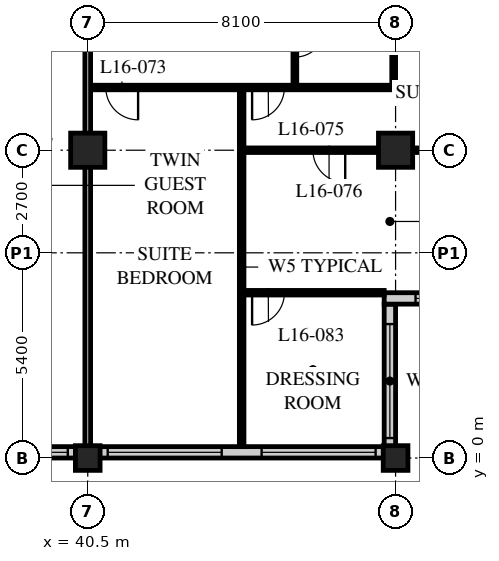
"""IFC4 building model, lengths in metres.
Left out: names, types, materials, properties, quantities, classifications, styles, units other than length and angle.
Written with IfcOpenShell. Run it as: python <this file> out.ifc"""

import sys

from ifc_helpers import new_model, si_unit, direction, frame, frame_2d, origin, origin_2d, place, context, subcontext, project, spatial, rectangle, hollow_rectangle, extrude, element, fill, save


model = new_model("IFC4")
c1 = context("Model", 3, precision=1e-05, world=origin(), true_north=direction((0.0, 1.0)))
c2 = subcontext(c1, "Body", "Model", "MODEL_VIEW")
j1 = project(units=[si_unit("LENGTHUNIT", "METRE"), si_unit("PLANEANGLEUNIT", "RADIAN")], contexts=[c1])
p1 = place(None, origin())
s1 = spatial("IfcSite", under=j1, at=p1, CompositionType="ELEMENT")
p2 = place(p1, origin())
s2 = spatial("IfcBuilding", under=s1, at=p2, CompositionType="ELEMENT")
p3 = place(p2, frame((0.0, 0.0, 67.0)))
s3 = spatial("IfcBuildingStorey", under=s2, at=p3, CompositionType="ELEMENT", Elevation=67.0)
p4 = place(p3, frame((40.5, 0.0, 0.0), z_axis=(0.0, 0.0, 1.0), x_axis=(1.0, 0.0, 0.0)))
e1 = element("IfcColumn", 1, at=p4, inside=s3, PredefinedType="COLUMN", context=c2, shape_type="SweptSolid", body=[
    extrude(hollow_rectangle(XDim=0.65, YDim=0.65, WallThickness=0.05, at=origin_2d()), origin(), (0.0, 0.0, 1.0), 3.4),
])
p5 = place(p3, frame((40.5, 8.1, 0.0), z_axis=(0.0, 0.0, 1.0), x_axis=(1.0, 0.0, 0.0)))
e2 = element("IfcColumn", 2, at=p5, inside=s3, PredefinedType="COLUMN", context=c2, shape_type="SweptSolid", body=[
    extrude(hollow_rectangle(XDim=0.9, YDim=0.9, WallThickness=0.09, at=origin_2d()), origin(), (0.0, 0.0, 1.0), 3.4),
])
p6 = place(p3, frame((48.6, 0.0, 0.0), z_axis=(0.0, 0.0, 1.0), x_axis=(1.0, 0.0, 0.0)))
e3 = element("IfcColumn", 3, at=p6, inside=s3, PredefinedType="COLUMN", context=c2, shape_type="SweptSolid", body=[
    extrude(hollow_rectangle(XDim=0.65, YDim=0.65, WallThickness=0.05, at=origin_2d()), origin(), (0.0, 0.0, 1.0), 3.4),
])
p7 = place(p3, frame((48.6, 8.1, 0.0), z_axis=(0.0, 0.0, 1.0), x_axis=(1.0, 0.0, 0.0)))
e4 = element("IfcColumn", 4, at=p7, inside=s3, PredefinedType="COLUMN", context=c2, shape_type="SweptSolid", body=[
    extrude(hollow_rectangle(XDim=0.9, YDim=0.9, WallThickness=0.09, at=origin_2d()), origin(), (0.0, 0.0, 1.0), 3.4),
])
p8 = place(p3, frame((8.4, 0.15, 0.0), z_axis=(0.0, 0.0, 1.0), x_axis=(1.0, 0.0, 0.0)))
e5 = element("IfcWall", 5, at=p8, inside=s3, PredefinedType="SOLIDWALL", context=c2, shape_type="SweptSolid", body=[
    extrude(rectangle(XDim=40.2, YDim=0.3, at=frame_2d((20.1, 0.0))), origin(), (0.0, 0.0, 1.0), 3.19),
])
p9 = place(p8, frame((0.225, 0.0, 0.9)))
e6 = element("IfcOpeningElement", 6, at=p9, cuts=e5, PredefinedType="OPENING", context=c2, shape_type="SweptSolid", body=[
    extrude(rectangle(XDim=3.0, YDim=2.0, at=frame_2d((1.5, 1.0))), frame((0.0, 0.16, 0.0), z_axis=(0.0, -1.0, 0.0), x_axis=(1.0, 0.0, 0.0)), (0.0, 0.0, 1.0), 0.32),
])
p10 = place(p8, frame((4.275, 0.0, 0.9)))
e7 = element("IfcOpeningElement", 7, at=p10, cuts=e5, PredefinedType="OPENING", context=c2, shape_type="SweptSolid", body=[
    extrude(rectangle(XDim=3.0, YDim=2.0, at=frame_2d((1.5, 1.0))), frame((0.0, 0.16, 0.0), z_axis=(0.0, -1.0, 0.0), x_axis=(1.0, 0.0, 0.0)), (0.0, 0.0, 1.0), 0.32),
])
p11 = place(p8, frame((8.325, 0.0, 0.9)))
e8 = element("IfcOpeningElement", 8, at=p11, cuts=e5, PredefinedType="OPENING", context=c2, shape_type="SweptSolid", body=[
    extrude(rectangle(XDim=3.0, YDim=2.0, at=frame_2d((1.5, 1.0))), frame((0.0, 0.16, 0.0), z_axis=(0.0, -1.0, 0.0), x_axis=(1.0, 0.0, 0.0)), (0.0, 0.0, 1.0), 0.32),
])
p12 = place(p8, frame((12.375, 0.0, 0.9)))
e9 = element("IfcOpeningElement", 9, at=p12, cuts=e5, PredefinedType="OPENING", context=c2, shape_type="SweptSolid", body=[
    extrude(rectangle(XDim=3.0, YDim=2.0, at=frame_2d((1.5, 1.0))), frame((0.0, 0.16, 0.0), z_axis=(0.0, -1.0, 0.0), x_axis=(1.0, 0.0, 0.0)), (0.0, 0.0, 1.0), 0.32),
])
p13 = place(p8, frame((16.425, 0.0, 0.9)))
e10 = element("IfcOpeningElement", 10, at=p13, cuts=e5, PredefinedType="OPENING", context=c2, shape_type="SweptSolid", body=[
    extrude(rectangle(XDim=3.0, YDim=2.0, at=frame_2d((1.5, 1.0))), frame((0.0, 0.16, 0.0), z_axis=(0.0, -1.0, 0.0), x_axis=(1.0, 0.0, 0.0)), (0.0, 0.0, 1.0), 0.32),
])
p14 = place(p8, frame((20.475, 0.0, 0.9)))
e11 = element("IfcOpeningElement", 11, at=p14, cuts=e5, PredefinedType="OPENING", context=c2, shape_type="SweptSolid", body=[
    extrude(rectangle(XDim=3.0, YDim=2.0, at=frame_2d((1.5, 1.0))), frame((0.0, 0.16, 0.0), z_axis=(0.0, -1.0, 0.0), x_axis=(1.0, 0.0, 0.0)), (0.0, 0.0, 1.0), 0.32),
])
p15 = place(p8, frame((24.525, 0.0, 0.9)))
e12 = element("IfcOpeningElement", 12, at=p15, cuts=e5, PredefinedType="OPENING", context=c2, shape_type="SweptSolid", body=[
    extrude(rectangle(XDim=3.0, YDim=2.0, at=frame_2d((1.5, 1.0))), frame((0.0, 0.16, 0.0), z_axis=(0.0, -1.0, 0.0), x_axis=(1.0, 0.0, 0.0)), (0.0, 0.0, 1.0), 0.32),
])
p16 = place(p8, frame((28.575, 0.0, 0.9)))
e13 = element("IfcOpeningElement", 13, at=p16, cuts=e5, PredefinedType="OPENING", context=c2, shape_type="SweptSolid", body=[
    extrude(rectangle(XDim=3.0, YDim=2.0, at=frame_2d((1.5, 1.0))), frame((0.0, 0.16, 0.0), z_axis=(0.0, -1.0, 0.0), x_axis=(1.0, 0.0, 0.0)), (0.0, 0.0, 1.0), 0.32),
])
p17 = place(p8, frame((32.625, 0.0, 0.9)))
e14 = element("IfcOpeningElement", 14, at=p17, cuts=e5, PredefinedType="OPENING", context=c2, shape_type="SweptSolid", body=[
    extrude(rectangle(XDim=3.0, YDim=2.0, at=frame_2d((1.5, 1.0))), frame((0.0, 0.16, 0.0), z_axis=(0.0, -1.0, 0.0), x_axis=(1.0, 0.0, 0.0)), (0.0, 0.0, 1.0), 0.32),
])
p18 = place(p8, frame((36.675, 0.0, 0.9)))
e15 = element("IfcOpeningElement", 15, at=p18, cuts=e5, PredefinedType="OPENING", context=c2, shape_type="SweptSolid", body=[
    extrude(rectangle(XDim=3.0, YDim=2.0, at=frame_2d((1.5, 1.0))), frame((0.0, 0.16, 0.0), z_axis=(0.0, -1.0, 0.0), x_axis=(1.0, 0.0, 0.0)), (0.0, 0.0, 1.0), 0.32),
])
p19 = place(p3, frame((48.45, 0.3, 0.0), z_axis=(0.0, 0.0, 1.0), x_axis=(0.0, 1.0, 0.0)))
e16 = element("IfcWall", 16, at=p19, inside=s3, PredefinedType="SOLIDWALL", context=c2, shape_type="SweptSolid", body=[
    extrude(rectangle(XDim=3.75, YDim=0.3, at=frame_2d((1.875, 0.0))), origin(), (0.0, 0.0, 1.0), 3.19),
])
p20 = place(p19, frame((0.225, 0.0, 0.9)))
e17 = element("IfcOpeningElement", 17, at=p20, cuts=e16, PredefinedType="OPENING", context=c2, shape_type="SweptSolid", body=[
    extrude(rectangle(XDim=3.0, YDim=1.5, at=frame_2d((1.5, 0.75))), frame((0.0, 0.16, 0.0), z_axis=(0.0, -1.0, 0.0), x_axis=(1.0, 0.0, 0.0)), (0.0, 0.0, 1.0), 0.32),
])
p21 = place(p3, frame((48.3, 4.2, 0.0), z_axis=(0.0, 0.0, 1.0), x_axis=(1.0, 0.0, 0.0)))
e18 = element("IfcWall", 18, at=p21, inside=s3, PredefinedType="SOLIDWALL", context=c2, shape_type="SweptSolid", body=[
    extrude(rectangle(XDim=4.35, YDim=0.3, at=frame_2d((2.175, 0.0))), origin(), (0.0, 0.0, 1.0), 3.19),
])
p22 = place(p21, frame((0.825, 0.0, 0.9)))
e19 = element("IfcOpeningElement", 19, at=p22, cuts=e18, PredefinedType="OPENING", context=c2, shape_type="SweptSolid", body=[
    extrude(rectangle(XDim=3.0, YDim=1.5, at=frame_2d((1.5, 0.75))), frame((0.0, 0.16, 0.0), z_axis=(0.0, -1.0, 0.0), x_axis=(1.0, 0.0, 0.0)), (0.0, 0.0, 1.0), 0.32),
])
p23 = place(p3, frame((40.5, 9.75, 0.0), z_axis=(0.0, 0.0, 1.0), x_axis=(1.0, 0.0, 0.0)))
e20 = element("IfcWall", 20, at=p23, inside=s3, PredefinedType="PARTITIONING", context=c2, shape_type="SweptSolid", body=[
    extrude(rectangle(XDim=8.05, YDim=0.12, at=frame_2d((4.025, 0.0))), origin(), (0.0, 0.0, 1.0), 3.19),
])
p24 = place(p23, frame((0.475, 0.0, 0.0)))
e21 = element("IfcOpeningElement", 21, at=p24, cuts=e20, PredefinedType="OPENING", context=c2, shape_type="SweptSolid", body=[
    extrude(rectangle(XDim=0.85, YDim=2.1, at=frame_2d((0.425, 1.05))), frame((0.0, 0.07, 0.0), z_axis=(0.0, -1.0, 0.0), x_axis=(1.0, 0.0, 0.0)), (0.0, 0.0, 1.0), 0.14),
])
p25 = place(p23, frame((4.325, 0.0, 0.0)))
e22 = element("IfcOpeningElement", 22, at=p25, cuts=e20, PredefinedType="OPENING", context=c2, shape_type="SweptSolid", body=[
    extrude(rectangle(XDim=0.85, YDim=2.1, at=frame_2d((0.425, 1.05))), frame((0.0, 0.07, 0.0), z_axis=(0.0, -1.0, 0.0), x_axis=(1.0, 0.0, 0.0)), (0.0, 0.0, 1.0), 0.14),
])
p26 = place(p3, frame((45.95, 12.15, 0.0), z_axis=(0.0, 0.0, 1.0), x_axis=(0.0, -1.0, 0.0)))
e23 = element("IfcWall", 23, at=p26, inside=s3, PredefinedType="PARTITIONING", context=c2, shape_type="SweptSolid", body=[
    extrude(rectangle(XDim=2.4, YDim=0.1, at=frame_2d((1.2, 0.0))), origin(), (0.0, 0.0, 1.0), 3.19),
])
p27 = place(p26, frame((0.8, 0.0, 0.0)))
e24 = element("IfcOpeningElement", 24, at=p27, cuts=e23, PredefinedType="OPENING", context=c2, shape_type="SweptSolid", body=[
    extrude(rectangle(XDim=0.8, YDim=2.1, at=frame_2d((0.4, 1.05))), frame((0.0, 0.06, 0.0), z_axis=(0.0, -1.0, 0.0), x_axis=(1.0, 0.0, 0.0)), (0.0, 0.0, 1.0), 0.12),
])
p28 = place(p3, frame((48.55, 12.15, 0.0), z_axis=(0.0, 0.0, 1.0), x_axis=(0.0, -1.0, 0.0)))
e25 = element("IfcWall", 25, at=p28, inside=s3, PredefinedType="PARTITIONING", context=c2, shape_type="SweptSolid", body=[
    extrude(rectangle(XDim=2.4, YDim=0.1, at=frame_2d((1.2, 0.0))), origin(), (0.0, 0.0, 1.0), 2.578),
])
p29 = place(p3, frame((44.55, 9.75, 0.0), z_axis=(0.0, 0.0, 1.0), x_axis=(0.0, -1.0, 0.0)))
e26 = element("IfcWall", 26, at=p29, inside=s3, PredefinedType="PARTITIONING", context=c2, shape_type="SweptSolid", body=[
    extrude(rectangle(XDim=9.45, YDim=0.12, at=frame_2d((4.725, 0.0))), origin(), (0.0, 0.0, 1.0), 3.19),
])
p30 = place(p3, frame((44.55, 8.1, 0.0), z_axis=(0.0, 0.0, 1.0), x_axis=(1.0, 0.0, 0.0)))
e27 = element("IfcWall", 27, at=p30, inside=s3, PredefinedType="PARTITIONING", context=c2, shape_type="SweptSolid", body=[
    extrude(rectangle(XDim=7.8, YDim=0.12, at=frame_2d((3.9, 0.0))), origin(), (0.0, 0.0, 1.0), 2.578),
])
p31 = place(p30, frame((1.875, 0.0, 0.0)))
e28 = element("IfcOpeningElement", 28, at=p31, cuts=e27, PredefinedType="OPENING", context=c2, shape_type="SweptSolid", body=[
    extrude(rectangle(XDim=0.85, YDim=2.1, at=frame_2d((0.425, 1.05))), frame((0.0, 0.07, 0.0), z_axis=(0.0, -1.0, 0.0), x_axis=(1.0, 0.0, 0.0)), (0.0, 0.0, 1.0), 0.14),
])
p32 = place(p3, frame((40.5, 12.15, 0.0), z_axis=(0.0, 0.0, 1.0), x_axis=(0.0, -1.0, 0.0)))
e29 = element("IfcWall", 29, at=p32, inside=s3, PredefinedType="PARTITIONING", context=c2, shape_type="SweptSolid", body=[
    extrude(rectangle(XDim=11.85, YDim=0.15, at=frame_2d((5.925, 0.0))), origin(), (0.0, 0.0, 1.0), 2.578),
])
p33 = place(p3, frame((44.55, 4.35, 0.0), z_axis=(0.0, 0.0, 1.0), x_axis=(1.0, 0.0, 0.0)))
e30 = element("IfcWall", 30, at=p33, inside=s3, PredefinedType="PARTITIONING", context=c2, shape_type="SweptSolid", body=[
    extrude(rectangle(XDim=3.75, YDim=0.12, at=frame_2d((1.875, 0.0))), origin(), (0.0, 0.0, 1.0), 3.19),
])
p34 = place(p33, frame((0.275, 0.0, 0.0)))
e31 = element("IfcOpeningElement", 31, at=p34, cuts=e30, PredefinedType="OPENING", context=c2, shape_type="SweptSolid", body=[
    extrude(rectangle(XDim=0.85, YDim=2.1, at=frame_2d((0.425, 1.05))), frame((0.0, 0.07, 0.0), z_axis=(0.0, -1.0, 0.0), x_axis=(1.0, 0.0, 0.0)), (0.0, 0.0, 1.0), 0.14),
])
p35 = place(p16, origin())
e32 = element("IfcWindow", 32, at=p35, inside=s3, PartitioningType="SINGLE_PANEL", PredefinedType="WINDOW", context=c2, shape_type="SweptSolid", body=[
    extrude(rectangle(XDim=3.0, YDim=2.0, at=frame_2d((1.5, 1.0))), frame((0.0, 0.03, 0.0), z_axis=(0.0, -1.0, 0.0), x_axis=(1.0, 0.0, 0.0)), (0.0, 0.0, 1.0), 0.06),
])
fill(e13, e32)
p36 = place(p17, origin())
e33 = element("IfcWindow", 33, at=p36, inside=s3, PartitioningType="SINGLE_PANEL", PredefinedType="WINDOW", context=c2, shape_type="SweptSolid", body=[
    extrude(rectangle(XDim=3.0, YDim=2.0, at=frame_2d((1.5, 1.0))), frame((0.0, 0.03, 0.0), z_axis=(0.0, -1.0, 0.0), x_axis=(1.0, 0.0, 0.0)), (0.0, 0.0, 1.0), 0.06),
])
fill(e14, e33)
p37 = place(p18, origin())
e34 = element("IfcWindow", 34, at=p37, inside=s3, PartitioningType="SINGLE_PANEL", PredefinedType="WINDOW", context=c2, shape_type="SweptSolid", body=[
    extrude(rectangle(XDim=3.0, YDim=2.0, at=frame_2d((1.5, 1.0))), frame((0.0, 0.03, 0.0), z_axis=(0.0, -1.0, 0.0), x_axis=(1.0, 0.0, 0.0)), (0.0, 0.0, 1.0), 0.06),
])
fill(e15, e34)
p38 = place(p20, origin())
e35 = element("IfcWindow", 35, at=p38, inside=s3, PartitioningType="SINGLE_PANEL", PredefinedType="WINDOW", context=c2, shape_type="SweptSolid", body=[
    extrude(rectangle(XDim=3.0, YDim=1.5, at=frame_2d((1.5, 0.75))), frame((0.0, 0.03, 0.0), z_axis=(0.0, -1.0, 0.0), x_axis=(1.0, 0.0, 0.0)), (0.0, 0.0, 1.0), 0.06),
])
fill(e17, e35)
p39 = place(p22, origin())
e36 = element("IfcWindow", 36, at=p39, inside=s3, PartitioningType="SINGLE_PANEL", PredefinedType="WINDOW", context=c2, shape_type="SweptSolid", body=[
    extrude(rectangle(XDim=3.0, YDim=1.5, at=frame_2d((1.5, 0.75))), frame((0.0, 0.03, 0.0), z_axis=(0.0, -1.0, 0.0), x_axis=(1.0, 0.0, 0.0)), (0.0, 0.0, 1.0), 0.06),
])
fill(e19, e36)
p40 = place(p24, origin())
e37 = element("IfcDoor", 37, at=p40, inside=s3, OperationType="SINGLE_SWING_LEFT", PredefinedType="DOOR", context=c2, shape_type="SweptSolid", body=[
    extrude(rectangle(XDim=0.85, YDim=2.1, at=frame_2d((0.425, 1.05))), frame((0.0, 0.025, 0.0), z_axis=(0.0, -1.0, 0.0), x_axis=(1.0, 0.0, 0.0)), (0.0, 0.0, 1.0), 0.05),
])
fill(e21, e37)
p41 = place(p27, origin())
e38 = element("IfcDoor", 38, at=p41, inside=s3, OperationType="SINGLE_SWING_LEFT", PredefinedType="DOOR", context=c2, shape_type="SweptSolid", body=[
    extrude(rectangle(XDim=0.8, YDim=2.1, at=frame_2d((0.4, 1.05))), frame((0.0, 0.025, 0.0), z_axis=(0.0, -1.0, 0.0), x_axis=(1.0, 0.0, 0.0)), (0.0, 0.0, 1.0), 0.05),
])
fill(e24, e38)
p42 = place(p25, origin())
e39 = element("IfcDoor", 39, at=p42, inside=s3, OperationType="SINGLE_SWING_RIGHT", PredefinedType="DOOR", context=c2, shape_type="SweptSolid", body=[
    extrude(rectangle(XDim=0.85, YDim=2.1, at=frame_2d((0.425, 1.05))), frame((0.0, 0.025, 0.0), z_axis=(0.0, -1.0, 0.0), x_axis=(1.0, 0.0, 0.0)), (0.0, 0.0, 1.0), 0.05),
])
fill(e22, e39)
p43 = place(p31, origin())
e40 = element("IfcDoor", 40, at=p43, inside=s3, OperationType="SINGLE_SWING_LEFT", PredefinedType="DOOR", context=c2, shape_type="SweptSolid", body=[
    extrude(rectangle(XDim=0.85, YDim=2.1, at=frame_2d((0.425, 1.05))), frame((0.0, 0.025, 0.0), z_axis=(0.0, -1.0, 0.0), x_axis=(1.0, 0.0, 0.0)), (0.0, 0.0, 1.0), 0.05),
])
fill(e28, e40)
p44 = place(p34, origin())
e41 = element("IfcDoor", 41, at=p44, inside=s3, OperationType="SINGLE_SWING_RIGHT", PredefinedType="DOOR", context=c2, shape_type="SweptSolid", body=[
    extrude(rectangle(XDim=0.85, YDim=2.1, at=frame_2d((0.425, 1.05))), frame((0.0, 0.025, 0.0), z_axis=(0.0, -1.0, 0.0), x_axis=(1.0, 0.0, 0.0)), (0.0, 0.0, 1.0), 0.05),
])
fill(e31, e41)
save(model, sys.argv[1])
